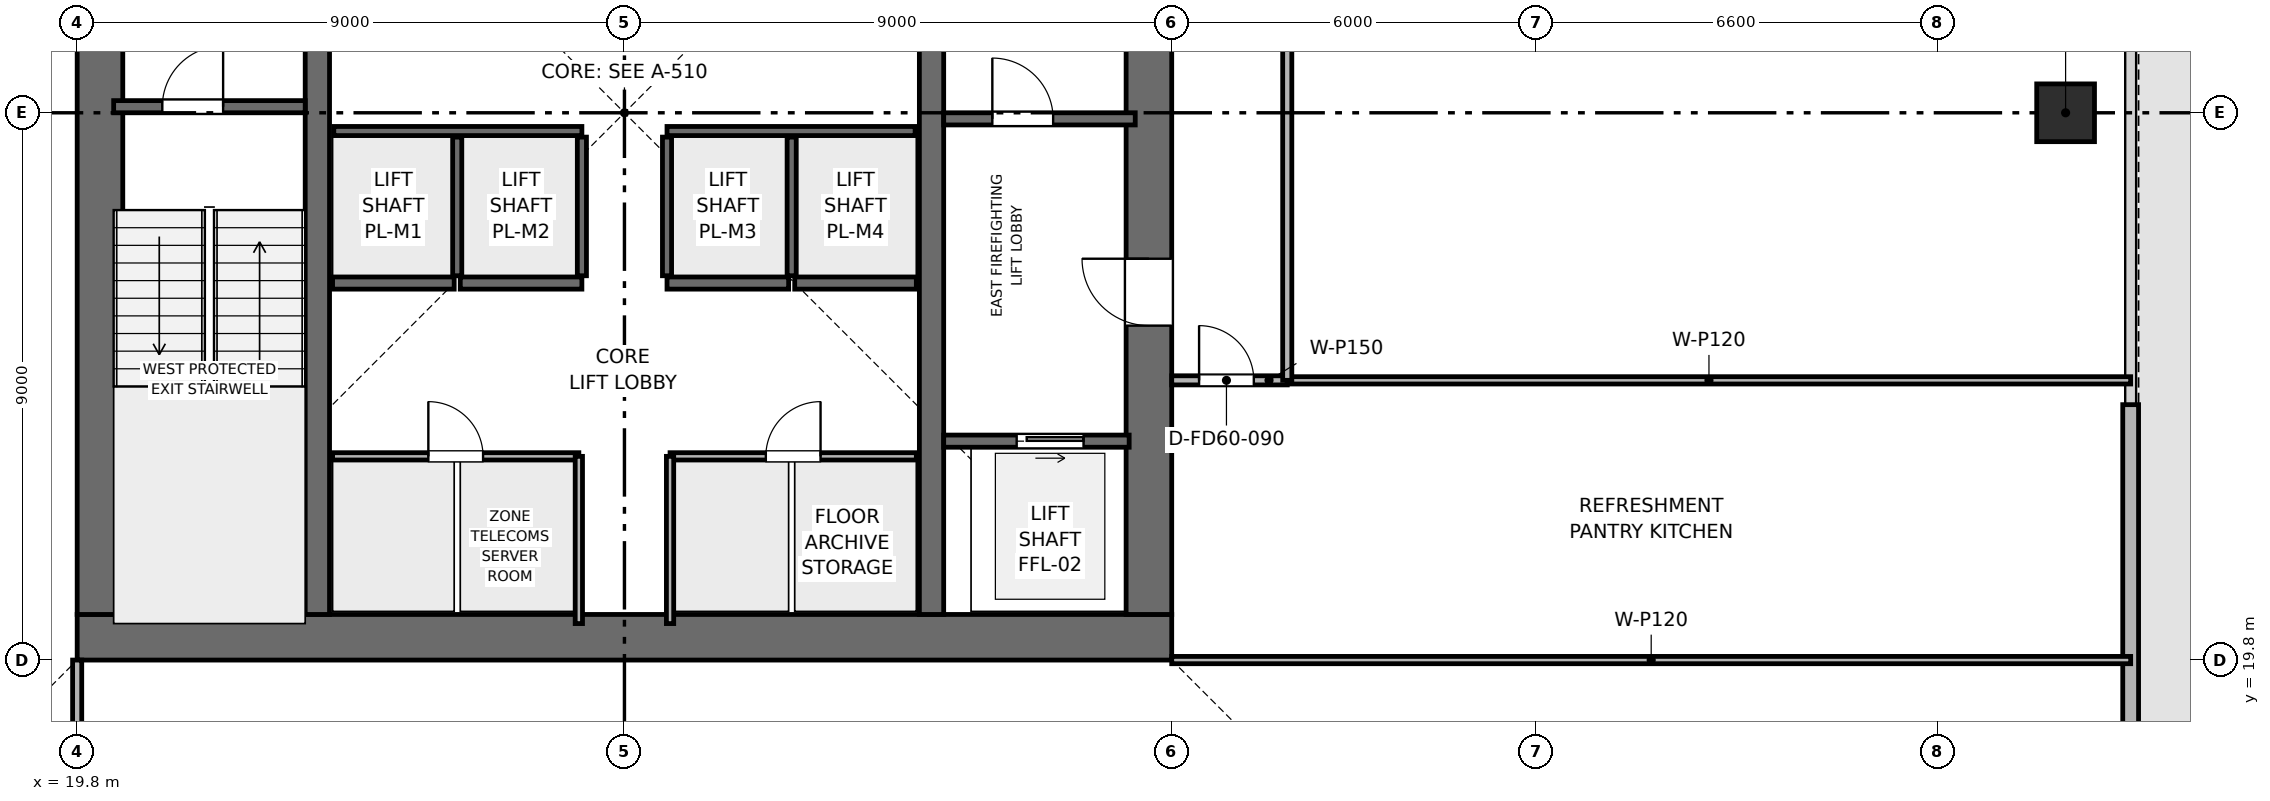
"""IFC4 building model, lengths in metres.
Left out: names, types, materials, properties, quantities, classifications, styles, units other than length and angle.
Written with IfcOpenShell. Run it as: python <this file> out.ifc"""

import sys

from ifc_helpers import new_model, si_unit, direction, frame, frame_2d, origin, origin_2d, place, context, subcontext, project, spatial, rectangle, extrude, element, fill, save


model = new_model("IFC4")
c1 = context("Model", 3, precision=1e-05, world=origin(), true_north=direction((0.0, 1.0)))
c2 = subcontext(c1, "Body", "Model", "MODEL_VIEW")
j1 = project(units=[si_unit("LENGTHUNIT", "METRE"), si_unit("PLANEANGLEUNIT", "RADIAN")], contexts=[c1])
p1 = place(None, origin())
s1 = spatial("IfcSite", under=j1, at=p1, CompositionType="ELEMENT")
p2 = place(p1, origin())
s2 = spatial("IfcBuilding", under=s1, at=p2, CompositionType="ELEMENT")
p3 = place(p2, frame((0.0, 0.0, 246.6)))
s3 = spatial("IfcBuildingStorey", under=s2, at=p3, CompositionType="ELEMENT", Elevation=246.6)
p4 = place(p3, frame((19.8, 20.175, 0.0), z_axis=(0.0, 0.0, 1.0), x_axis=(1.0, 0.0, 0.0)))
e1 = element("IfcWall", 1, at=p4, inside=s3, PredefinedType="SHEAR", context=c2, shape_type="SweptSolid", body=[
    extrude(rectangle(XDim=18.0, YDim=0.75, at=frame_2d((9.0, 0.0))), origin(), (0.0, 0.0, 1.0), 3.75),
])
p5 = place(p3, frame((20.175, 20.55, 0.0), z_axis=(0.0, 0.0, 1.0), x_axis=(0.0, 1.0, 0.0)))
e2 = element("IfcWall", 2, at=p5, inside=s3, PredefinedType="SHEAR", context=c2, shape_type="SweptSolid", body=[
    extrude(rectangle(XDim=16.5, YDim=0.75, at=frame_2d((8.25, 0.0))), origin(), (0.0, 0.0, 1.0), 3.75),
])
p6 = place(p5, frame((10.25, 0.0, 0.0)))
e3 = element("IfcOpeningElement", 3, at=p6, cuts=e2, PredefinedType="OPENING", context=c2, shape_type="SweptSolid", body=[
    extrude(rectangle(XDim=1.1, YDim=2.15, at=frame_2d((0.55, 1.075))), frame((0.0, 0.385, 0.0), z_axis=(0.0, -1.0, 0.0), x_axis=(1.0, 0.0, 0.0)), (0.0, 0.0, 1.0), 0.77),
])
p7 = place(p3, frame((37.425, 20.55, 0.0), z_axis=(0.0, 0.0, 1.0), x_axis=(0.0, 1.0, 0.0)))
e4 = element("IfcWall", 4, at=p7, inside=s3, PredefinedType="SHEAR", context=c2, shape_type="SweptSolid", body=[
    extrude(rectangle(XDim=16.5, YDim=0.75, at=frame_2d((8.25, 0.0))), origin(), (0.0, 0.0, 1.0), 3.75),
])
p8 = place(p7, frame((4.75, 0.0, 0.0)))
e5 = element("IfcOpeningElement", 5, at=p8, cuts=e4, PredefinedType="OPENING", context=c2, shape_type="SweptSolid", body=[
    extrude(rectangle(XDim=1.1, YDim=2.15, at=frame_2d((0.55, 1.075))), frame((0.0, 0.385, 0.0), z_axis=(0.0, -1.0, 0.0), x_axis=(1.0, 0.0, 0.0)), (0.0, 0.0, 1.0), 0.77),
])
for number, where, z_axis, x_axis in (
    (6, (23.75, 20.55, 0.0), (0.0, 0.0, 1.0), (0.0, 1.0, 0.0)),
    (7, (33.85, 20.55, 0.0), (0.0, 0.0, 1.0), (0.0, 1.0, 0.0)),
):
    element("IfcWall", number, at=place(p3, frame(where, z_axis=z_axis, x_axis=x_axis)), inside=s3, PredefinedType="SHEAR", context=c2, shape_type="SweptSolid", body=[
        extrude(rectangle(XDim=16.5, YDim=0.4, at=frame_2d((8.25, 0.0))), origin(), (0.0, 0.0, 1.0), 3.75),
    ])
p9 = place(p3, frame((52.5, 28.8, 0.003), z_axis=(0.0, 0.0, 1.0), x_axis=(1.0, 0.0, 0.0)))
e8 = element("IfcColumn", 8, at=p9, inside=s3, PredefinedType="COLUMN", context=c2, shape_type="SweptSolid", body=[
    extrude(rectangle(XDim=0.95, YDim=0.95, at=origin_2d()), origin(), (0.0, 0.0, 1.0), 3.494),
])
p10 = place(p3, frame((53.57, 24.0, 0.0), z_axis=(0.0, 0.0, 1.0), x_axis=(0.0, -1.0, 0.0)))
e9 = element("IfcWall", 9, at=p10, inside=s3, PredefinedType="SOLIDWALL", context=c2, shape_type="SweptSolid", body=[
    extrude(rectangle(XDim=13.2, YDim=0.26, at=frame_2d((6.6, 0.0))), origin(), (0.0, 0.0, 1.0), 3.5),
])
p11 = place(p10, frame((11.75, 0.0, 0.9)))
e10 = element("IfcOpeningElement", 10, at=p11, cuts=e9, PredefinedType="OPENING", context=c2, shape_type="SweptSolid", body=[
    extrude(rectangle(XDim=1.2, YDim=2.1, at=frame_2d((0.6, 1.05))), frame((0.0, 0.14, 0.0), z_axis=(0.0, -1.0, 0.0), x_axis=(1.0, 0.0, 0.0)), (0.0, 0.0, 1.0), 0.28),
])
p12 = place(p3, frame((20.4, 28.9, 0.0), z_axis=(0.0, 0.0, 1.0), x_axis=(1.0, 0.0, 0.0)))
e11 = element("IfcWall", 11, at=p12, inside=s3, PredefinedType="SHEAR", context=c2, shape_type="SweptSolid", body=[
    extrude(rectangle(XDim=3.15, YDim=0.2, at=frame_2d((1.575, 0.0))), origin(), (0.0, 0.0, 1.0), 3.5),
])
p13 = place(p12, frame((0.8, 0.0, 0.0)))
e12 = element("IfcOpeningElement", 12, at=p13, cuts=e11, PredefinedType="OPENING", context=c2, shape_type="SweptSolid", body=[
    extrude(rectangle(XDim=1.0, YDim=2.1, at=frame_2d((0.5, 1.05))), frame((0.0, 0.11, 0.0), z_axis=(0.0, -1.0, 0.0), x_axis=(1.0, 0.0, 0.0)), (0.0, 0.0, 1.0), 0.22),
])
p14 = place(p3, frame((34.05, 28.7, 0.0), z_axis=(0.0, 0.0, 1.0), x_axis=(1.0, 0.0, 0.0)))
e13 = element("IfcWall", 13, at=p14, inside=s3, PredefinedType="SHEAR", context=c2, shape_type="SweptSolid", body=[
    extrude(rectangle(XDim=3.15, YDim=0.2, at=frame_2d((1.575, 0.0))), origin(), (0.0, 0.0, 1.0), 3.5),
])
p15 = place(p14, frame((0.8, 0.0, 0.0)))
e14 = element("IfcOpeningElement", 14, at=p15, cuts=e13, PredefinedType="OPENING", context=c2, shape_type="SweptSolid", body=[
    extrude(rectangle(XDim=1.0, YDim=2.1, at=frame_2d((0.5, 1.05))), frame((0.0, 0.11, 0.0), z_axis=(0.0, -1.0, 0.0), x_axis=(1.0, 0.0, 0.0)), (0.0, 0.0, 1.0), 0.22),
])
p16 = place(p3, frame((34.05, 23.4, 0.0), z_axis=(0.0, 0.0, 1.0), x_axis=(1.0, 0.0, 0.0)))
e15 = element("IfcWall", 15, at=p16, inside=s3, PredefinedType="SHEAR", context=c2, shape_type="SweptSolid", body=[
    extrude(rectangle(XDim=3.05, YDim=0.2, at=frame_2d((1.525, 0.0))), origin(), (0.0, 0.0, 1.0), 3.5),
])
p17 = place(p16, frame((1.2, 0.0, 0.0)))
e16 = element("IfcOpeningElement", 16, at=p17, cuts=e15, PredefinedType="OPENING", context=c2, shape_type="SweptSolid", body=[
    extrude(rectangle(XDim=1.1, YDim=2.15, at=frame_2d((0.55, 1.075))), frame((0.0, 0.11, 0.0), z_axis=(0.0, -1.0, 0.0), x_axis=(1.0, 0.0, 0.0)), (0.0, 0.0, 1.0), 0.22),
])
for number, where, z_axis, x_axis in (
    (17, (24.0, 26.0, 0.0), (0.0, 0.0, 1.0), (1.0, 0.0, 0.0)),
    (18, (26.1, 26.0, 0.0), (0.0, 0.0, 1.0), (1.0, 0.0, 0.0)),
    (19, (29.5, 26.0, 0.0), (0.0, 0.0, 1.0), (1.0, 0.0, 0.0)),
    (20, (31.6, 26.0, 0.0), (0.0, 0.0, 1.0), (1.0, 0.0, 0.0)),
):
    element("IfcWall", number, at=place(p3, frame(where, z_axis=z_axis, x_axis=x_axis)), inside=s3, PredefinedType="SHEAR", context=c2, shape_type="SweptSolid", body=[
        extrude(rectangle(XDim=2.0, YDim=0.2, at=frame_2d((1.0, 0.0))), origin(), (0.0, 0.0, 1.0), 3.5),
    ])
for number, where, z_axis, x_axis in (
    (21, (24.02, 28.5, 0.0), (0.0, 0.0, 1.0), (1.0, 0.0, 0.0)),
    (22, (29.5, 28.5, 0.0), (0.0, 0.0, 1.0), (1.0, 0.0, 0.0)),
):
    element("IfcWall", number, at=place(p3, frame(where, z_axis=z_axis, x_axis=x_axis)), inside=s3, PredefinedType="SHEAR", context=c2, shape_type="SweptSolid", body=[
        extrude(rectangle(XDim=4.08, YDim=0.15, at=frame_2d((2.04, 0.0))), origin(), (0.0, 0.0, 1.0), 3.5),
    ])
for number, where, z_axis, x_axis in (
    (23, (26.05, 26.12, 0.0), (0.0, 0.0, 1.0), (0.0, 1.0, 0.0)),
    (24, (28.1, 26.12, 0.0), (0.0, 0.0, 1.0), (0.0, 1.0, 0.0)),
    (25, (29.5, 26.12, 0.0), (0.0, 0.0, 1.0), (0.0, 1.0, 0.0)),
    (26, (31.55, 26.12, 0.0), (0.0, 0.0, 1.0), (0.0, 1.0, 0.0)),
):
    element("IfcWall", number, at=place(p3, frame(where, z_axis=z_axis, x_axis=x_axis)), inside=s3, PredefinedType="SHEAR", context=c2, shape_type="SweptSolid", body=[
        extrude(rectangle(XDim=2.28, YDim=0.15, at=frame_2d((1.14, 0.0))), origin(), (0.0, 0.0, 1.0), 3.5),
    ])
p18 = place(p3, frame((24.0, 23.15, 0.0), z_axis=(0.0, 0.0, 1.0), x_axis=(1.0, 0.0, 0.0)))
e27 = element("IfcWall", 27, at=p18, inside=s3, PredefinedType="PARTITIONING", context=c2, shape_type="SweptSolid", body=[
    extrude(rectangle(XDim=4.05, YDim=0.12, at=frame_2d((2.025, 0.0))), origin(), (0.0, 0.0, 1.0), 3.5),
])
p19 = place(p18, frame((1.575, 0.0, 0.0)))
e28 = element("IfcOpeningElement", 28, at=p19, cuts=e27, PredefinedType="OPENING", context=c2, shape_type="SweptSolid", body=[
    extrude(rectangle(XDim=0.9, YDim=2.1, at=frame_2d((0.45, 1.05))), frame((0.0, 0.07, 0.0), z_axis=(0.0, -1.0, 0.0), x_axis=(1.0, 0.0, 0.0)), (0.0, 0.0, 1.0), 0.14),
])
p20 = place(p3, frame((28.05, 20.4, 0.0), z_axis=(0.0, 0.0, 1.0), x_axis=(0.0, 1.0, 0.0)))
e29 = element("IfcWall", 29, at=p20, inside=s3, PredefinedType="PARTITIONING", context=c2, shape_type="SweptSolid", body=[
    extrude(rectangle(XDim=2.75, YDim=0.12, at=frame_2d((1.375, 0.0))), origin(), (0.0, 0.0, 1.0), 3.5),
])
p21 = place(p3, frame((29.55, 23.15, 0.0), z_axis=(0.0, 0.0, 1.0), x_axis=(1.0, 0.0, 0.0)))
e30 = element("IfcWall", 30, at=p21, inside=s3, PredefinedType="PARTITIONING", context=c2, shape_type="SweptSolid", body=[
    extrude(rectangle(XDim=4.05, YDim=0.12, at=frame_2d((2.025, 0.0))), origin(), (0.0, 0.0, 1.0), 3.5),
])
p22 = place(p21, frame((1.575, 0.0, 0.0)))
e31 = element("IfcOpeningElement", 31, at=p22, cuts=e30, PredefinedType="OPENING", context=c2, shape_type="SweptSolid", body=[
    extrude(rectangle(XDim=0.9, YDim=2.1, at=frame_2d((0.45, 1.05))), frame((0.0, 0.07, 0.0), z_axis=(0.0, -1.0, 0.0), x_axis=(1.0, 0.0, 0.0)), (0.0, 0.0, 1.0), 0.14),
])
p23 = place(p3, frame((29.55, 20.4, 0.0), z_axis=(0.0, 0.0, 1.0), x_axis=(0.0, 1.0, 0.0)))
e32 = element("IfcWall", 32, at=p23, inside=s3, PredefinedType="PARTITIONING", context=c2, shape_type="SweptSolid", body=[
    extrude(rectangle(XDim=2.75, YDim=0.12, at=frame_2d((1.375, 0.0))), origin(), (0.0, 0.0, 1.0), 3.5),
])
p24 = place(p3, frame((19.8, 4.03, 0.0), z_axis=(0.0, 0.0, 1.0), x_axis=(0.0, 1.0, 0.0)))
e33 = element("IfcWall", 33, at=p24, inside=s3, PredefinedType="PARTITIONING", context=c2, shape_type="SweptSolid", body=[
    extrude(rectangle(XDim=15.77, YDim=0.15, at=frame_2d((7.885, 0.0))), origin(), (0.0, 0.0, 1.0), 3.085),
])
p25 = place(p24, frame((10.82, 0.0, 0.0)))
e34 = element("IfcOpeningElement", 34, at=p25, cuts=e33, PredefinedType="OPENING", context=c2, shape_type="SweptSolid", body=[
    extrude(rectangle(XDim=0.9, YDim=2.1, at=frame_2d((0.45, 1.05))), frame((0.0, 0.085, 0.0), z_axis=(0.0, -1.0, 0.0), x_axis=(1.0, 0.0, 0.0)), (0.0, 0.0, 1.0), 0.17),
])
p26 = place(p3, frame((37.8, 19.8, 0.0), z_axis=(0.0, 0.0, 1.0), x_axis=(1.0, 0.0, 0.0)))
e35 = element("IfcWall", 35, at=p26, inside=s3, PredefinedType="PARTITIONING", context=c2, shape_type="SweptSolid", body=[
    extrude(rectangle(XDim=15.77, YDim=0.12, at=frame_2d((7.885, 0.0))), origin(), (0.0, 0.0, 1.0), 3.085),
])
p27 = place(p3, frame((37.8, 24.4, 0.0), z_axis=(0.0, 0.0, 1.0), x_axis=(1.0, 0.0, 0.0)))
e36 = element("IfcWall", 36, at=p27, inside=s3, PredefinedType="PARTITIONING", context=c2, shape_type="SweptSolid", body=[
    extrude(rectangle(XDim=1.9, YDim=0.15, at=frame_2d((0.95, 0.0))), origin(), (0.0, 0.0, 1.0), 3.5),
])
p28 = place(p27, frame((0.45, 0.0, 0.0)))
e37 = element("IfcOpeningElement", 37, at=p28, cuts=e36, PredefinedType="OPENING", context=c2, shape_type="SweptSolid", body=[
    extrude(rectangle(XDim=0.9, YDim=2.1, at=frame_2d((0.45, 1.05))), frame((0.0, 0.085, 0.0), z_axis=(0.0, -1.0, 0.0), x_axis=(1.0, 0.0, 0.0)), (0.0, 0.0, 1.0), 0.17),
])
p29 = place(p3, frame((39.7, 24.4, 0.0), z_axis=(0.0, 0.0, 1.0), x_axis=(1.0, 0.0, 0.0)))
e38 = element("IfcWall", 38, at=p29, inside=s3, PredefinedType="PARTITIONING", context=c2, shape_type="SweptSolid", body=[
    extrude(rectangle(XDim=13.87, YDim=0.12, at=frame_2d((6.935, 0.0))), origin(), (0.0, 0.0, 1.0), 3.085),
])
p30 = place(p3, frame((39.7, 24.4, 0.0), z_axis=(0.0, 0.0, 1.0), x_axis=(0.0, 1.0, 0.0)))
e39 = element("IfcWall", 39, at=p30, inside=s3, PredefinedType="PARTITIONING", context=c2, shape_type="SweptSolid", body=[
    extrude(rectangle(XDim=15.3, YDim=0.15, at=frame_2d((7.65, 0.0))), origin(), (0.0, 0.0, 1.0), 3.085),
])
p31 = place(p30, frame((7.2, 0.0, 0.0)))
e40 = element("IfcOpeningElement", 40, at=p31, cuts=e39, PredefinedType="OPENING", context=c2, shape_type="SweptSolid", body=[
    extrude(rectangle(XDim=0.9, YDim=2.1, at=frame_2d((0.45, 1.05))), frame((0.0, 0.085, 0.0), z_axis=(0.0, -1.0, 0.0), x_axis=(1.0, 0.0, 0.0)), (0.0, 0.0, 1.0), 0.17),
])
p32 = place(p13, origin())
e41 = element("IfcDoor", 41, at=p32, inside=s3, OperationType="SINGLE_SWING_RIGHT", PredefinedType="DOOR", context=c2, shape_type="SweptSolid", body=[
    extrude(rectangle(XDim=1.0, YDim=2.1, at=frame_2d((0.5, 1.05))), frame((0.0, 0.025, 0.0), z_axis=(0.0, -1.0, 0.0), x_axis=(1.0, 0.0, 0.0)), (0.0, 0.0, 1.0), 0.05),
])
fill(e12, e41)
p33 = place(p15, origin())
e42 = element("IfcDoor", 42, at=p33, inside=s3, OperationType="SINGLE_SWING_LEFT", PredefinedType="DOOR", context=c2, shape_type="SweptSolid", body=[
    extrude(rectangle(XDim=1.0, YDim=2.1, at=frame_2d((0.5, 1.05))), frame((0.0, 0.025, 0.0), z_axis=(0.0, -1.0, 0.0), x_axis=(1.0, 0.0, 0.0)), (0.0, 0.0, 1.0), 0.05),
])
fill(e14, e42)
p34 = place(p17, origin())
e43 = element("IfcDoor", 43, at=p34, inside=s3, OperationType="SLIDING_TO_RIGHT", PredefinedType="DOOR", context=c2, shape_type="SweptSolid", body=[
    extrude(rectangle(XDim=1.1, YDim=2.15, at=frame_2d((0.55, 1.075))), frame((0.0, 0.025, 0.0), z_axis=(0.0, -1.0, 0.0), x_axis=(1.0, 0.0, 0.0)), (0.0, 0.0, 1.0), 0.05),
])
fill(e16, e43)
p35 = place(p19, origin())
e44 = element("IfcDoor", 44, at=p35, inside=s3, OperationType="SINGLE_SWING_LEFT", PredefinedType="DOOR", context=c2, shape_type="SweptSolid", body=[
    extrude(rectangle(XDim=0.9, YDim=2.1, at=frame_2d((0.45, 1.05))), frame((0.0, 0.025, 0.0), z_axis=(0.0, -1.0, 0.0), x_axis=(1.0, 0.0, 0.0)), (0.0, 0.0, 1.0), 0.05),
])
fill(e28, e44)
p36 = place(p22, origin())
e45 = element("IfcDoor", 45, at=p36, inside=s3, OperationType="SINGLE_SWING_RIGHT", PredefinedType="DOOR", context=c2, shape_type="SweptSolid", body=[
    extrude(rectangle(XDim=0.9, YDim=2.1, at=frame_2d((0.45, 1.05))), frame((0.0, 0.025, 0.0), z_axis=(0.0, -1.0, 0.0), x_axis=(1.0, 0.0, 0.0)), (0.0, 0.0, 1.0), 0.05),
])
fill(e31, e45)
p37 = place(p28, origin())
e46 = element("IfcDoor", 46, at=p37, inside=s3, OperationType="SINGLE_SWING_LEFT", PredefinedType="DOOR", context=c2, shape_type="SweptSolid", body=[
    extrude(rectangle(XDim=0.9, YDim=2.1, at=frame_2d((0.45, 1.05))), frame((0.0, 0.025, 0.0), z_axis=(0.0, -1.0, 0.0), x_axis=(1.0, 0.0, 0.0)), (0.0, 0.0, 1.0), 0.05),
])
fill(e37, e46)
p38 = place(p8, origin())
e47 = element("IfcDoor", 47, at=p38, inside=s3, OperationType="SINGLE_SWING_RIGHT", PredefinedType="DOOR", context=c2, shape_type="SweptSolid", body=[
    extrude(rectangle(XDim=1.1, YDim=2.15, at=frame_2d((0.55, 1.075))), frame((0.0, 0.025, 0.0), z_axis=(0.0, -1.0, 0.0), x_axis=(1.0, 0.0, 0.0)), (0.0, 0.0, 1.0), 0.05),
])
fill(e5, e47)
save(model, sys.argv[1])
